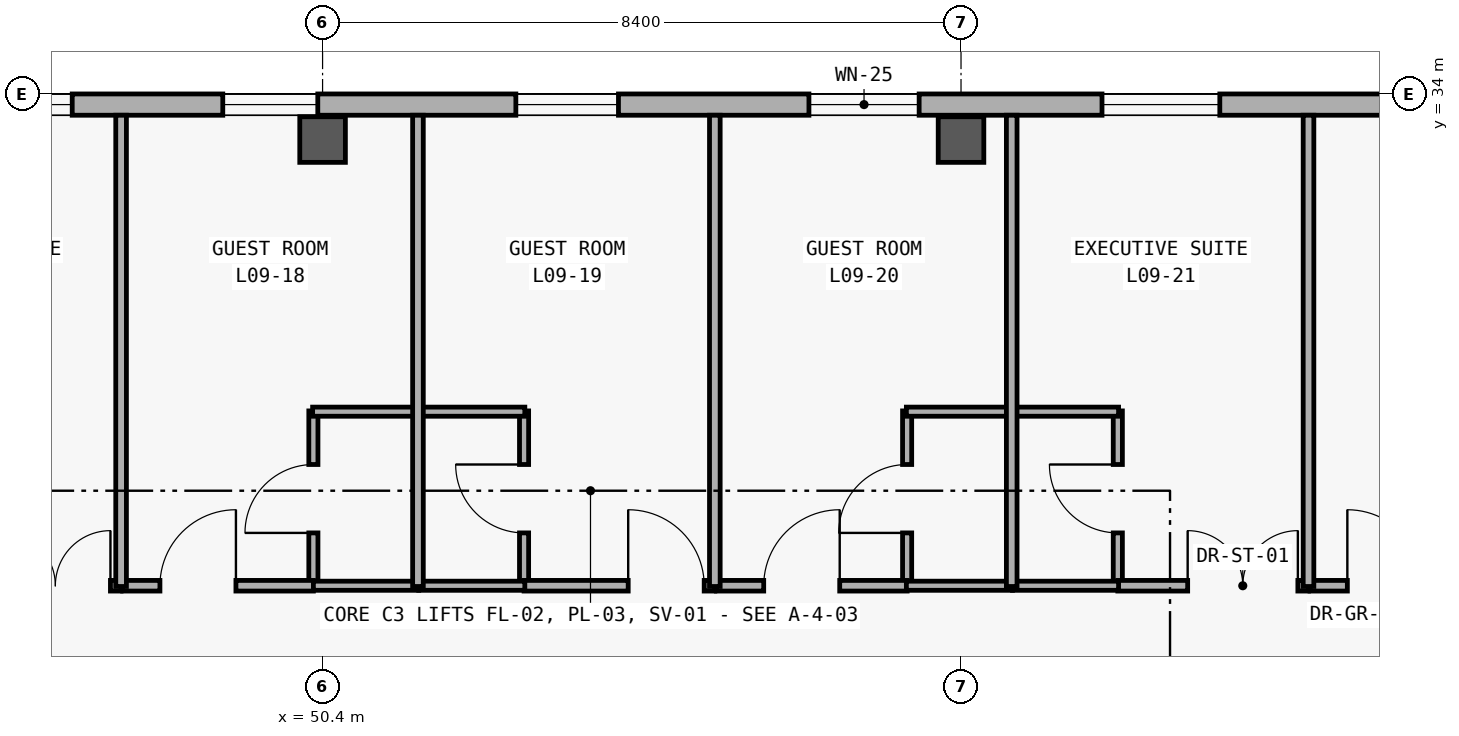
"""IFC4 building model, lengths in metres.
Left out: names, types, materials, properties, quantities, classifications, styles, units other than length and angle.
Written with IfcOpenShell. Run it as: python <this file> out.ifc"""

import sys

from ifc_helpers import new_model, si_unit, direction, frame, frame_2d, origin, origin_2d, place, context, subcontext, project, spatial, rectangle, extrude, element, fill, save


model = new_model("IFC4")
c1 = context("Model", 3, precision=1e-05, world=origin(), true_north=direction((0.0, 1.0)))
c2 = subcontext(c1, "Body", "Model", "MODEL_VIEW")
j1 = project(units=[si_unit("LENGTHUNIT", "METRE"), si_unit("PLANEANGLEUNIT", "RADIAN")], contexts=[c1])
p1 = place(None, origin())
s1 = spatial("IfcSite", under=j1, at=p1, CompositionType="ELEMENT")
p2 = place(p1, origin())
s2 = spatial("IfcBuilding", under=s1, at=p2, CompositionType="ELEMENT")
p3 = place(p2, frame((0.0, 0.0, 37.2)))
s3 = spatial("IfcBuildingStorey", under=s2, at=p3, CompositionType="ELEMENT", Elevation=37.2)
for number, where, z_axis, x_axis in (
    (1, (50.4, 33.4, 0.0), (0.0, 0.0, 1.0), (1.0, 0.0, 0.0)),
    (2, (58.8, 33.4, 0.0), (0.0, 0.0, 1.0), (1.0, 0.0, 0.0)),
):
    element("IfcColumn", number, at=place(p3, frame(where, z_axis=z_axis, x_axis=x_axis)), inside=s3, PredefinedType="COLUMN", context=c2, shape_type="SweptSolid", body=[
        extrude(rectangle(XDim=0.6, YDim=0.6, at=origin_2d()), origin(), (0.0, 0.0, 1.0), 3.6),
    ])
p4 = place(p3, frame((17.08, 33.86, 0.0), z_axis=(0.0, 0.0, 1.0), x_axis=(1.0, 0.0, 0.0)))
e3 = element("IfcWall", 3, at=p4, inside=s3, PredefinedType="SOLIDWALL", context=c2, shape_type="SweptSolid", body=[
    extrude(rectangle(XDim=58.24, YDim=0.28, at=frame_2d((29.12, 0.0))), origin(), (0.0, 0.0, 1.0), 3.34),
])
p5 = place(p4, frame((4.87, 0.0, 0.85)))
e4 = element("IfcOpeningElement", 4, at=p5, cuts=e3, PredefinedType="OPENING", context=c2, shape_type="SweptSolid", body=[
    extrude(rectangle(XDim=1.55, YDim=1.65, at=frame_2d((0.775, 0.825))), frame((0.0, 0.15, 0.0), z_axis=(0.0, -1.0, 0.0), x_axis=(1.0, 0.0, 0.0)), (0.0, 0.0, 1.0), 0.3),
])
p6 = place(p4, frame((12.303, 0.0, 0.85)))
e5 = element("IfcOpeningElement", 5, at=p6, cuts=e3, PredefinedType="OPENING", context=c2, shape_type="SweptSolid", body=[
    extrude(rectangle(XDim=1.6, YDim=1.6, at=frame_2d((0.8, 0.8))), frame((0.0, 0.15, 0.0), z_axis=(0.0, -1.0, 0.0), x_axis=(1.0, 0.0, 0.0)), (0.0, 0.0, 1.0), 0.3),
])
p7 = place(p4, frame((16.109, 0.0, 0.85)))
e6 = element("IfcOpeningElement", 6, at=p7, cuts=e3, PredefinedType="OPENING", context=c2, shape_type="SweptSolid", body=[
    extrude(rectangle(XDim=1.8, YDim=1.6, at=frame_2d((0.9, 0.8))), frame((0.0, 0.15, 0.0), z_axis=(0.0, -1.0, 0.0), x_axis=(1.0, 0.0, 0.0)), (0.0, 0.0, 1.0), 0.3),
])
p8 = place(p4, frame((19.915, 0.0, 0.85)))
e7 = element("IfcOpeningElement", 7, at=p8, cuts=e3, PredefinedType="OPENING", context=c2, shape_type="SweptSolid", body=[
    extrude(rectangle(XDim=2.0, YDim=1.65, at=frame_2d((1.0, 0.825))), frame((0.0, 0.15, 0.0), z_axis=(0.0, -1.0, 0.0), x_axis=(1.0, 0.0, 0.0)), (0.0, 0.0, 1.0), 0.3),
])
p9 = place(p4, frame((23.72, 0.0, 0.85)))
e8 = element("IfcOpeningElement", 8, at=p9, cuts=e3, PredefinedType="OPENING", context=c2, shape_type="SweptSolid", body=[
    extrude(rectangle(XDim=2.2, YDim=1.65, at=frame_2d((1.1, 0.825))), frame((0.0, 0.15, 0.0), z_axis=(0.0, -1.0, 0.0), x_axis=(1.0, 0.0, 0.0)), (0.0, 0.0, 1.0), 0.3),
])
p10 = place(p4, frame((27.426, 0.0, 0.85)))
e9 = element("IfcOpeningElement", 9, at=p10, cuts=e3, PredefinedType="OPENING", context=c2, shape_type="SweptSolid", body=[
    extrude(rectangle(XDim=2.6, YDim=2.2, at=frame_2d((1.3, 1.1))), frame((0.0, 0.15, 0.0), z_axis=(0.0, -1.0, 0.0), x_axis=(1.0, 0.0, 0.0)), (0.0, 0.0, 1.0), 0.3),
])
p11 = place(p4, frame((32.007, 0.0, 0.85)))
e10 = element("IfcOpeningElement", 10, at=p11, cuts=e3, PredefinedType="OPENING", context=c2, shape_type="SweptSolid", body=[
    extrude(rectangle(XDim=1.25, YDim=1.45, at=frame_2d((0.625, 0.725))), frame((0.0, 0.15, 0.0), z_axis=(0.0, -1.0, 0.0), x_axis=(1.0, 0.0, 0.0)), (0.0, 0.0, 1.0), 0.3),
])
p12 = place(p4, frame((35.863, 0.0, 0.85)))
e11 = element("IfcOpeningElement", 11, at=p12, cuts=e3, PredefinedType="OPENING", context=c2, shape_type="SweptSolid", body=[
    extrude(rectangle(XDim=1.35, YDim=1.55, at=frame_2d((0.675, 0.775))), frame((0.0, 0.15, 0.0), z_axis=(0.0, -1.0, 0.0), x_axis=(1.0, 0.0, 0.0)), (0.0, 0.0, 1.0), 0.3),
])
p13 = place(p4, frame((39.719, 0.0, 0.85)))
e12 = element("IfcOpeningElement", 12, at=p13, cuts=e3, PredefinedType="OPENING", context=c2, shape_type="SweptSolid", body=[
    extrude(rectangle(XDim=1.45, YDim=1.65, at=frame_2d((0.725, 0.825))), frame((0.0, 0.15, 0.0), z_axis=(0.0, -1.0, 0.0), x_axis=(1.0, 0.0, 0.0)), (0.0, 0.0, 1.0), 0.3),
])
p14 = place(p4, frame((43.575, 0.0, 0.85)))
e13 = element("IfcOpeningElement", 13, at=p14, cuts=e3, PredefinedType="OPENING", context=c2, shape_type="SweptSolid", body=[
    extrude(rectangle(XDim=1.55, YDim=1.65, at=frame_2d((0.775, 0.825))), frame((0.0, 0.15, 0.0), z_axis=(0.0, -1.0, 0.0), x_axis=(1.0, 0.0, 0.0)), (0.0, 0.0, 1.0), 0.3),
])
p15 = place(p4, frame((47.405, 0.0, 0.85)))
e14 = element("IfcOpeningElement", 14, at=p15, cuts=e3, PredefinedType="OPENING", context=c2, shape_type="SweptSolid", body=[
    extrude(rectangle(XDim=1.7, YDim=2.0, at=frame_2d((0.85, 1.0))), frame((0.0, 0.15, 0.0), z_axis=(0.0, -1.0, 0.0), x_axis=(1.0, 0.0, 0.0)), (0.0, 0.0, 1.0), 0.3),
])
p16 = place(p4, frame((51.011, 0.0, 0.85)))
e15 = element("IfcOpeningElement", 15, at=p16, cuts=e3, PredefinedType="OPENING", context=c2, shape_type="SweptSolid", body=[
    extrude(rectangle(XDim=2.3, YDim=2.05, at=frame_2d((1.15, 1.025))), frame((0.0, 0.15, 0.0), z_axis=(0.0, -1.0, 0.0), x_axis=(1.0, 0.0, 0.0)), (0.0, 0.0, 1.0), 0.3),
])
p17 = place(p4, frame((54.692, 0.0, 0.85)))
e16 = element("IfcOpeningElement", 16, at=p17, cuts=e3, PredefinedType="OPENING", context=c2, shape_type="SweptSolid", body=[
    extrude(rectangle(XDim=2.75, YDim=2.1, at=frame_2d((1.375, 1.05))), frame((0.0, 0.15, 0.0), z_axis=(0.0, -1.0, 0.0), x_axis=(1.0, 0.0, 0.0)), (0.0, 0.0, 1.0), 0.3),
])
p18 = place(p3, frame((50.279, 27.52, 0.0), z_axis=(0.0, 0.0, 1.0), x_axis=(0.0, 1.0, 0.0)))
e17 = element("IfcWall", 17, at=p18, inside=s3, PredefinedType="PARTITIONING", context=c2, shape_type="SweptSolid", body=[
    extrude(rectangle(XDim=2.31, YDim=0.12, at=frame_2d((1.155, 0.0))), origin(), (0.0, 0.0, 1.0), 2.48),
])
p19 = place(p18, frame((0.705, 0.0, 0.0)))
e18 = element("IfcOpeningElement", 18, at=p19, cuts=e17, PredefinedType="OPENING", context=c2, shape_type="SweptSolid", body=[
    extrude(rectangle(XDim=0.9, YDim=2.18, at=frame_2d((0.45, 1.09))), frame((0.0, 0.07, 0.0), z_axis=(0.0, -1.0, 0.0), x_axis=(1.0, 0.0, 0.0)), (0.0, 0.0, 1.0), 0.14),
])
p20 = place(p3, frame((53.051, 27.52, 0.0), z_axis=(0.0, 0.0, 1.0), x_axis=(0.0, 1.0, 0.0)))
e19 = element("IfcWall", 19, at=p20, inside=s3, PredefinedType="PARTITIONING", context=c2, shape_type="SweptSolid", body=[
    extrude(rectangle(XDim=2.31, YDim=0.12, at=frame_2d((1.155, 0.0))), origin(), (0.0, 0.0, 1.0), 2.48),
])
p21 = place(p20, frame((0.705, 0.0, 0.0)))
e20 = element("IfcOpeningElement", 20, at=p21, cuts=e19, PredefinedType="OPENING", context=c2, shape_type="SweptSolid", body=[
    extrude(rectangle(XDim=0.9, YDim=2.18, at=frame_2d((0.45, 1.09))), frame((0.0, 0.07, 0.0), z_axis=(0.0, -1.0, 0.0), x_axis=(1.0, 0.0, 0.0)), (0.0, 0.0, 1.0), 0.14),
])
p22 = place(p3, frame((58.091, 27.52, 0.0), z_axis=(0.0, 0.0, 1.0), x_axis=(0.0, 1.0, 0.0)))
e21 = element("IfcWall", 21, at=p22, inside=s3, PredefinedType="PARTITIONING", context=c2, shape_type="SweptSolid", body=[
    extrude(rectangle(XDim=2.31, YDim=0.12, at=frame_2d((1.155, 0.0))), origin(), (0.0, 0.0, 1.0), 2.48),
])
p23 = place(p22, frame((0.705, 0.0, 0.0)))
e22 = element("IfcOpeningElement", 22, at=p23, cuts=e21, PredefinedType="OPENING", context=c2, shape_type="SweptSolid", body=[
    extrude(rectangle(XDim=0.9, YDim=2.18, at=frame_2d((0.45, 1.09))), frame((0.0, 0.07, 0.0), z_axis=(0.0, -1.0, 0.0), x_axis=(1.0, 0.0, 0.0)), (0.0, 0.0, 1.0), 0.14),
])
p24 = place(p3, frame((60.863, 27.52, 0.0), z_axis=(0.0, 0.0, 1.0), x_axis=(0.0, 1.0, 0.0)))
e23 = element("IfcWall", 23, at=p24, inside=s3, PredefinedType="PARTITIONING", context=c2, shape_type="SweptSolid", body=[
    extrude(rectangle(XDim=2.31, YDim=0.12, at=frame_2d((1.155, 0.0))), origin(), (0.0, 0.0, 1.0), 2.48),
])
p25 = place(p24, frame((0.705, 0.0, 0.0)))
e24 = element("IfcOpeningElement", 24, at=p25, cuts=e23, PredefinedType="OPENING", context=c2, shape_type="SweptSolid", body=[
    extrude(rectangle(XDim=0.9, YDim=2.18, at=frame_2d((0.45, 1.09))), frame((0.0, 0.07, 0.0), z_axis=(0.0, -1.0, 0.0), x_axis=(1.0, 0.0, 0.0)), (0.0, 0.0, 1.0), 0.14),
])
p26 = place(p3, frame((45.239, 27.53, 0.0), z_axis=(0.0, 0.0, 1.0), x_axis=(1.0, 0.0, 0.0)))
e25 = element("IfcWall", 25, at=p26, inside=s3, PredefinedType="PARTITIONING", context=c2, shape_type="SweptSolid", body=[
    extrude(rectangle(XDim=2.51, YDim=0.14, at=frame_2d((1.255, 0.0))), origin(), (0.0, 0.0, 1.0), 2.48),
])
p27 = place(p26, frame((0.92, 0.0, 0.0)))
e26 = element("IfcOpeningElement", 26, at=p27, cuts=e25, PredefinedType="OPENING", context=c2, shape_type="SweptSolid", body=[
    extrude(rectangle(XDim=1.45, YDim=2.3, at=frame_2d((0.725, 1.15))), frame((0.0, 0.08, 0.0), z_axis=(0.0, -1.0, 0.0), x_axis=(1.0, 0.0, 0.0)), (0.0, 0.0, 1.0), 0.16),
])
p28 = place(p3, frame((47.769, 27.53, 0.0), z_axis=(0.0, 0.0, 1.0), x_axis=(1.0, 0.0, 0.0)))
e27 = element("IfcWall", 27, at=p28, inside=s3, PredefinedType="PARTITIONING", context=c2, shape_type="SweptSolid", body=[
    extrude(rectangle(XDim=2.51, YDim=0.14, at=frame_2d((1.255, 0.0))), origin(), (0.0, 0.0, 1.0), 2.48),
])
p29 = place(p28, frame((0.491, 0.0, 0.0)))
e28 = element("IfcOpeningElement", 28, at=p29, cuts=e27, PredefinedType="OPENING", context=c2, shape_type="SweptSolid", body=[
    extrude(rectangle(XDim=1.0, YDim=2.28, at=frame_2d((0.5, 1.14))), frame((0.0, 0.08, 0.0), z_axis=(0.0, -1.0, 0.0), x_axis=(1.0, 0.0, 0.0)), (0.0, 0.0, 1.0), 0.16),
])
p30 = place(p3, frame((53.051, 27.53, 0.0), z_axis=(0.0, 0.0, 1.0), x_axis=(1.0, 0.0, 0.0)))
e29 = element("IfcWall", 29, at=p30, inside=s3, PredefinedType="PARTITIONING", context=c2, shape_type="SweptSolid", body=[
    extrude(rectangle(XDim=2.51, YDim=0.14, at=frame_2d((1.255, 0.0))), origin(), (0.0, 0.0, 1.0), 2.48),
])
p31 = place(p30, frame((1.37, 0.0, 0.0)))
e30 = element("IfcOpeningElement", 30, at=p31, cuts=e29, PredefinedType="OPENING", context=c2, shape_type="SweptSolid", body=[
    extrude(rectangle(XDim=1.0, YDim=2.28, at=frame_2d((0.5, 1.14))), frame((0.0, 0.08, 0.0), z_axis=(0.0, -1.0, 0.0), x_axis=(1.0, 0.0, 0.0)), (0.0, 0.0, 1.0), 0.16),
])
p32 = place(p3, frame((55.581, 27.53, 0.0), z_axis=(0.0, 0.0, 1.0), x_axis=(1.0, 0.0, 0.0)))
e31 = element("IfcWall", 31, at=p32, inside=s3, PredefinedType="PARTITIONING", context=c2, shape_type="SweptSolid", body=[
    extrude(rectangle(XDim=2.51, YDim=0.14, at=frame_2d((1.255, 0.0))), origin(), (0.0, 0.0, 1.0), 2.48),
])
p33 = place(p32, frame((0.623, 0.0, 0.0)))
e32 = element("IfcOpeningElement", 32, at=p33, cuts=e31, PredefinedType="OPENING", context=c2, shape_type="SweptSolid", body=[
    extrude(rectangle(XDim=1.0, YDim=2.28, at=frame_2d((0.5, 1.14))), frame((0.0, 0.08, 0.0), z_axis=(0.0, -1.0, 0.0), x_axis=(1.0, 0.0, 0.0)), (0.0, 0.0, 1.0), 0.16),
])
p34 = place(p3, frame((60.863, 27.53, 0.0), z_axis=(0.0, 0.0, 1.0), x_axis=(1.0, 0.0, 0.0)))
e33 = element("IfcWall", 33, at=p34, inside=s3, PredefinedType="PARTITIONING", context=c2, shape_type="SweptSolid", body=[
    extrude(rectangle(XDim=2.509, YDim=0.14, at=frame_2d((1.254, 0.0))), origin(), (0.0, 0.0, 1.0), 2.48),
])
p35 = place(p34, frame((0.919, 0.0, 0.0)))
e34 = element("IfcOpeningElement", 34, at=p35, cuts=e33, PredefinedType="OPENING", context=c2, shape_type="SweptSolid", body=[
    extrude(rectangle(XDim=1.45, YDim=2.3, at=frame_2d((0.725, 1.15))), frame((0.0, 0.08, 0.0), z_axis=(0.0, -1.0, 0.0), x_axis=(1.0, 0.0, 0.0)), (0.0, 0.0, 1.0), 0.16),
])
p36 = place(p3, frame((63.392, 27.53, 0.0), z_axis=(0.0, 0.0, 1.0), x_axis=(1.0, 0.0, 0.0)))
e35 = element("IfcWall", 35, at=p36, inside=s3, PredefinedType="PARTITIONING", context=c2, shape_type="SweptSolid", body=[
    extrude(rectangle(XDim=2.51, YDim=0.14, at=frame_2d((1.255, 0.0))), origin(), (0.0, 0.0, 1.0), 2.48),
])
p37 = place(p36, frame((0.491, 0.0, 0.0)))
e36 = element("IfcOpeningElement", 36, at=p37, cuts=e35, PredefinedType="OPENING", context=c2, shape_type="SweptSolid", body=[
    extrude(rectangle(XDim=1.0, YDim=2.28, at=frame_2d((0.5, 1.14))), frame((0.0, 0.08, 0.0), z_axis=(0.0, -1.0, 0.0), x_axis=(1.0, 0.0, 0.0)), (0.0, 0.0, 1.0), 0.16),
])
p38 = place(p3, frame((50.279, 27.53, 0.0), z_axis=(0.0, 0.0, 1.0), x_axis=(1.0, 0.0, 0.0)))
e37 = element("IfcWall", 37, at=p38, inside=s3, PredefinedType="PARTITIONING", context=c2, shape_type="SweptSolid", body=[
    extrude(rectangle(XDim=1.386, YDim=0.12, at=frame_2d((0.693, 0.0))), origin(), (0.0, 0.0, 1.0), 2.48),
])
for number, where, z_axis, x_axis in (
    (38, (50.269, 29.82, 0.0), (0.0, 0.0, 1.0), (1.0, 0.0, 0.0)),
    (39, (51.665, 27.53, 0.0), (0.0, 0.0, 1.0), (1.0, 0.0, 0.0)),
    (40, (51.665, 29.82, 0.0), (0.0, 0.0, 1.0), (1.0, 0.0, 0.0)),
    (41, (58.081, 27.53, 0.0), (0.0, 0.0, 1.0), (1.0, 0.0, 0.0)),
    (42, (58.081, 29.82, 0.0), (0.0, 0.0, 1.0), (1.0, 0.0, 0.0)),
    (43, (59.477, 27.53, 0.0), (0.0, 0.0, 1.0), (1.0, 0.0, 0.0)),
    (44, (59.477, 29.82, 0.0), (0.0, 0.0, 1.0), (1.0, 0.0, 0.0)),
):
    element("IfcWall", number, at=place(p3, frame(where, z_axis=z_axis, x_axis=x_axis)), inside=s3, PredefinedType="PARTITIONING", context=c2, shape_type="SweptSolid", body=[
        extrude(rectangle(XDim=1.396, YDim=0.12, at=frame_2d((0.698, 0.0))), origin(), (0.0, 0.0, 1.0), 2.48),
    ])
for number, where, z_axis, x_axis in (
    (45, (47.749, 27.52, 0.0), (0.0, 0.0, 1.0), (0.0, 1.0, 0.0)),
    (46, (51.655, 27.52, 0.0), (0.0, 0.0, 1.0), (0.0, 1.0, 0.0)),
    (47, (55.561, 27.52, 0.0), (0.0, 0.0, 1.0), (0.0, 1.0, 0.0)),
    (48, (59.467, 27.52, 0.0), (0.0, 0.0, 1.0), (0.0, 1.0, 0.0)),
    (49, (63.372, 27.52, 0.0), (0.0, 0.0, 1.0), (0.0, 1.0, 0.0)),
):
    element("IfcWall", number, at=place(p3, frame(where, z_axis=z_axis, x_axis=x_axis)), inside=s3, PredefinedType="PARTITIONING", context=c2, shape_type="SweptSolid", body=[
        extrude(rectangle(XDim=6.2, YDim=0.14, at=frame_2d((3.1, 0.0))), origin(), (0.0, 0.0, 1.0), 2.48),
    ])
p39 = place(p10, origin())
e50 = element("IfcWindow", 50, at=p39, inside=s3, PartitioningType="SINGLE_PANEL", PredefinedType="WINDOW", context=c2, shape_type="SweptSolid", body=[
    extrude(rectangle(XDim=2.6, YDim=2.2, at=frame_2d((1.3, 1.1))), frame((0.0, 0.03, 0.0), z_axis=(0.0, -1.0, 0.0), x_axis=(1.0, 0.0, 0.0)), (0.0, 0.0, 1.0), 0.06),
])
fill(e9, e50)
p40 = place(p11, origin())
e51 = element("IfcWindow", 51, at=p40, inside=s3, PartitioningType="SINGLE_PANEL", PredefinedType="WINDOW", context=c2, shape_type="SweptSolid", body=[
    extrude(rectangle(XDim=1.25, YDim=1.45, at=frame_2d((0.625, 0.725))), frame((0.0, 0.03, 0.0), z_axis=(0.0, -1.0, 0.0), x_axis=(1.0, 0.0, 0.0)), (0.0, 0.0, 1.0), 0.06),
])
fill(e10, e51)
p41 = place(p12, origin())
e52 = element("IfcWindow", 52, at=p41, inside=s3, PartitioningType="SINGLE_PANEL", PredefinedType="WINDOW", context=c2, shape_type="SweptSolid", body=[
    extrude(rectangle(XDim=1.35, YDim=1.55, at=frame_2d((0.675, 0.775))), frame((0.0, 0.03, 0.0), z_axis=(0.0, -1.0, 0.0), x_axis=(1.0, 0.0, 0.0)), (0.0, 0.0, 1.0), 0.06),
])
fill(e11, e52)
p42 = place(p13, origin())
e53 = element("IfcWindow", 53, at=p42, inside=s3, PartitioningType="SINGLE_PANEL", PredefinedType="WINDOW", context=c2, shape_type="SweptSolid", body=[
    extrude(rectangle(XDim=1.45, YDim=1.65, at=frame_2d((0.725, 0.825))), frame((0.0, 0.03, 0.0), z_axis=(0.0, -1.0, 0.0), x_axis=(1.0, 0.0, 0.0)), (0.0, 0.0, 1.0), 0.06),
])
fill(e12, e53)
p43 = place(p14, origin())
e54 = element("IfcWindow", 54, at=p43, inside=s3, PartitioningType="SINGLE_PANEL", PredefinedType="WINDOW", context=c2, shape_type="SweptSolid", body=[
    extrude(rectangle(XDim=1.55, YDim=1.65, at=frame_2d((0.775, 0.825))), frame((0.0, 0.03, 0.0), z_axis=(0.0, -1.0, 0.0), x_axis=(1.0, 0.0, 0.0)), (0.0, 0.0, 1.0), 0.06),
])
fill(e13, e54)
p44 = place(p19, origin())
e55 = element("IfcDoor", 55, at=p44, inside=s3, OperationType="SINGLE_SWING_LEFT", PredefinedType="DOOR", context=c2, shape_type="SweptSolid", body=[
    extrude(rectangle(XDim=0.9, YDim=2.18, at=frame_2d((0.45, 1.09))), frame((0.0, 0.025, 0.0), z_axis=(0.0, -1.0, 0.0), x_axis=(1.0, 0.0, 0.0)), (0.0, 0.0, 1.0), 0.05),
])
fill(e18, e55)
p45 = place(p21, origin())
e56 = element("IfcDoor", 56, at=p45, inside=s3, OperationType="SINGLE_SWING_RIGHT", PredefinedType="DOOR", context=c2, shape_type="SweptSolid", body=[
    extrude(rectangle(XDim=0.9, YDim=2.18, at=frame_2d((0.45, 1.09))), frame((0.0, 0.025, 0.0), z_axis=(0.0, -1.0, 0.0), x_axis=(1.0, 0.0, 0.0)), (0.0, 0.0, 1.0), 0.05),
])
fill(e20, e56)
p46 = place(p23, origin())
e57 = element("IfcDoor", 57, at=p46, inside=s3, OperationType="SINGLE_SWING_LEFT", PredefinedType="DOOR", context=c2, shape_type="SweptSolid", body=[
    extrude(rectangle(XDim=0.9, YDim=2.18, at=frame_2d((0.45, 1.09))), frame((0.0, 0.025, 0.0), z_axis=(0.0, -1.0, 0.0), x_axis=(1.0, 0.0, 0.0)), (0.0, 0.0, 1.0), 0.05),
])
fill(e22, e57)
p47 = place(p25, origin())
e58 = element("IfcDoor", 58, at=p47, inside=s3, OperationType="SINGLE_SWING_RIGHT", PredefinedType="DOOR", context=c2, shape_type="SweptSolid", body=[
    extrude(rectangle(XDim=0.9, YDim=2.18, at=frame_2d((0.45, 1.09))), frame((0.0, 0.025, 0.0), z_axis=(0.0, -1.0, 0.0), x_axis=(1.0, 0.0, 0.0)), (0.0, 0.0, 1.0), 0.05),
])
fill(e24, e58)
p48 = place(p27, origin())
e59 = element("IfcDoor", 59, at=p48, inside=s3, OperationType="DOUBLE_DOOR_SINGLE_SWING", PredefinedType="DOOR", context=c2, shape_type="SweptSolid", body=[
    extrude(rectangle(XDim=1.45, YDim=2.3, at=frame_2d((0.725, 1.15))), frame((0.0, 0.025, 0.0), z_axis=(0.0, -1.0, 0.0), x_axis=(1.0, 0.0, 0.0)), (0.0, 0.0, 1.0), 0.05),
])
fill(e26, e59)
p49 = place(p29, origin())
e60 = element("IfcDoor", 60, at=p49, inside=s3, OperationType="SINGLE_SWING_RIGHT", PredefinedType="DOOR", context=c2, shape_type="SweptSolid", body=[
    extrude(rectangle(XDim=1.0, YDim=2.28, at=frame_2d((0.5, 1.14))), frame((0.0, 0.025, 0.0), z_axis=(0.0, -1.0, 0.0), x_axis=(1.0, 0.0, 0.0)), (0.0, 0.0, 1.0), 0.05),
])
fill(e28, e60)
p50 = place(p31, origin())
e61 = element("IfcDoor", 61, at=p50, inside=s3, OperationType="SINGLE_SWING_LEFT", PredefinedType="DOOR", context=c2, shape_type="SweptSolid", body=[
    extrude(rectangle(XDim=1.0, YDim=2.28, at=frame_2d((0.5, 1.14))), frame((0.0, 0.025, 0.0), z_axis=(0.0, -1.0, 0.0), x_axis=(1.0, 0.0, 0.0)), (0.0, 0.0, 1.0), 0.05),
])
fill(e30, e61)
p51 = place(p33, origin())
e62 = element("IfcDoor", 62, at=p51, inside=s3, OperationType="SINGLE_SWING_RIGHT", PredefinedType="DOOR", context=c2, shape_type="SweptSolid", body=[
    extrude(rectangle(XDim=1.0, YDim=2.28, at=frame_2d((0.5, 1.14))), frame((0.0, 0.025, 0.0), z_axis=(0.0, -1.0, 0.0), x_axis=(1.0, 0.0, 0.0)), (0.0, 0.0, 1.0), 0.05),
])
fill(e32, e62)
p52 = place(p35, origin())
e63 = element("IfcDoor", 63, at=p52, inside=s3, OperationType="DOUBLE_DOOR_SINGLE_SWING", PredefinedType="DOOR", context=c2, shape_type="SweptSolid", body=[
    extrude(rectangle(XDim=1.45, YDim=2.3, at=frame_2d((0.725, 1.15))), frame((0.0, 0.025, 0.0), z_axis=(0.0, -1.0, 0.0), x_axis=(1.0, 0.0, 0.0)), (0.0, 0.0, 1.0), 0.05),
])
fill(e34, e63)
p53 = place(p37, origin())
e64 = element("IfcDoor", 64, at=p53, inside=s3, OperationType="SINGLE_SWING_LEFT", PredefinedType="DOOR", context=c2, shape_type="SweptSolid", body=[
    extrude(rectangle(XDim=1.0, YDim=2.28, at=frame_2d((0.5, 1.14))), frame((0.0, 0.025, 0.0), z_axis=(0.0, -1.0, 0.0), x_axis=(1.0, 0.0, 0.0)), (0.0, 0.0, 1.0), 0.05),
])
fill(e36, e64)
save(model, sys.argv[1])
